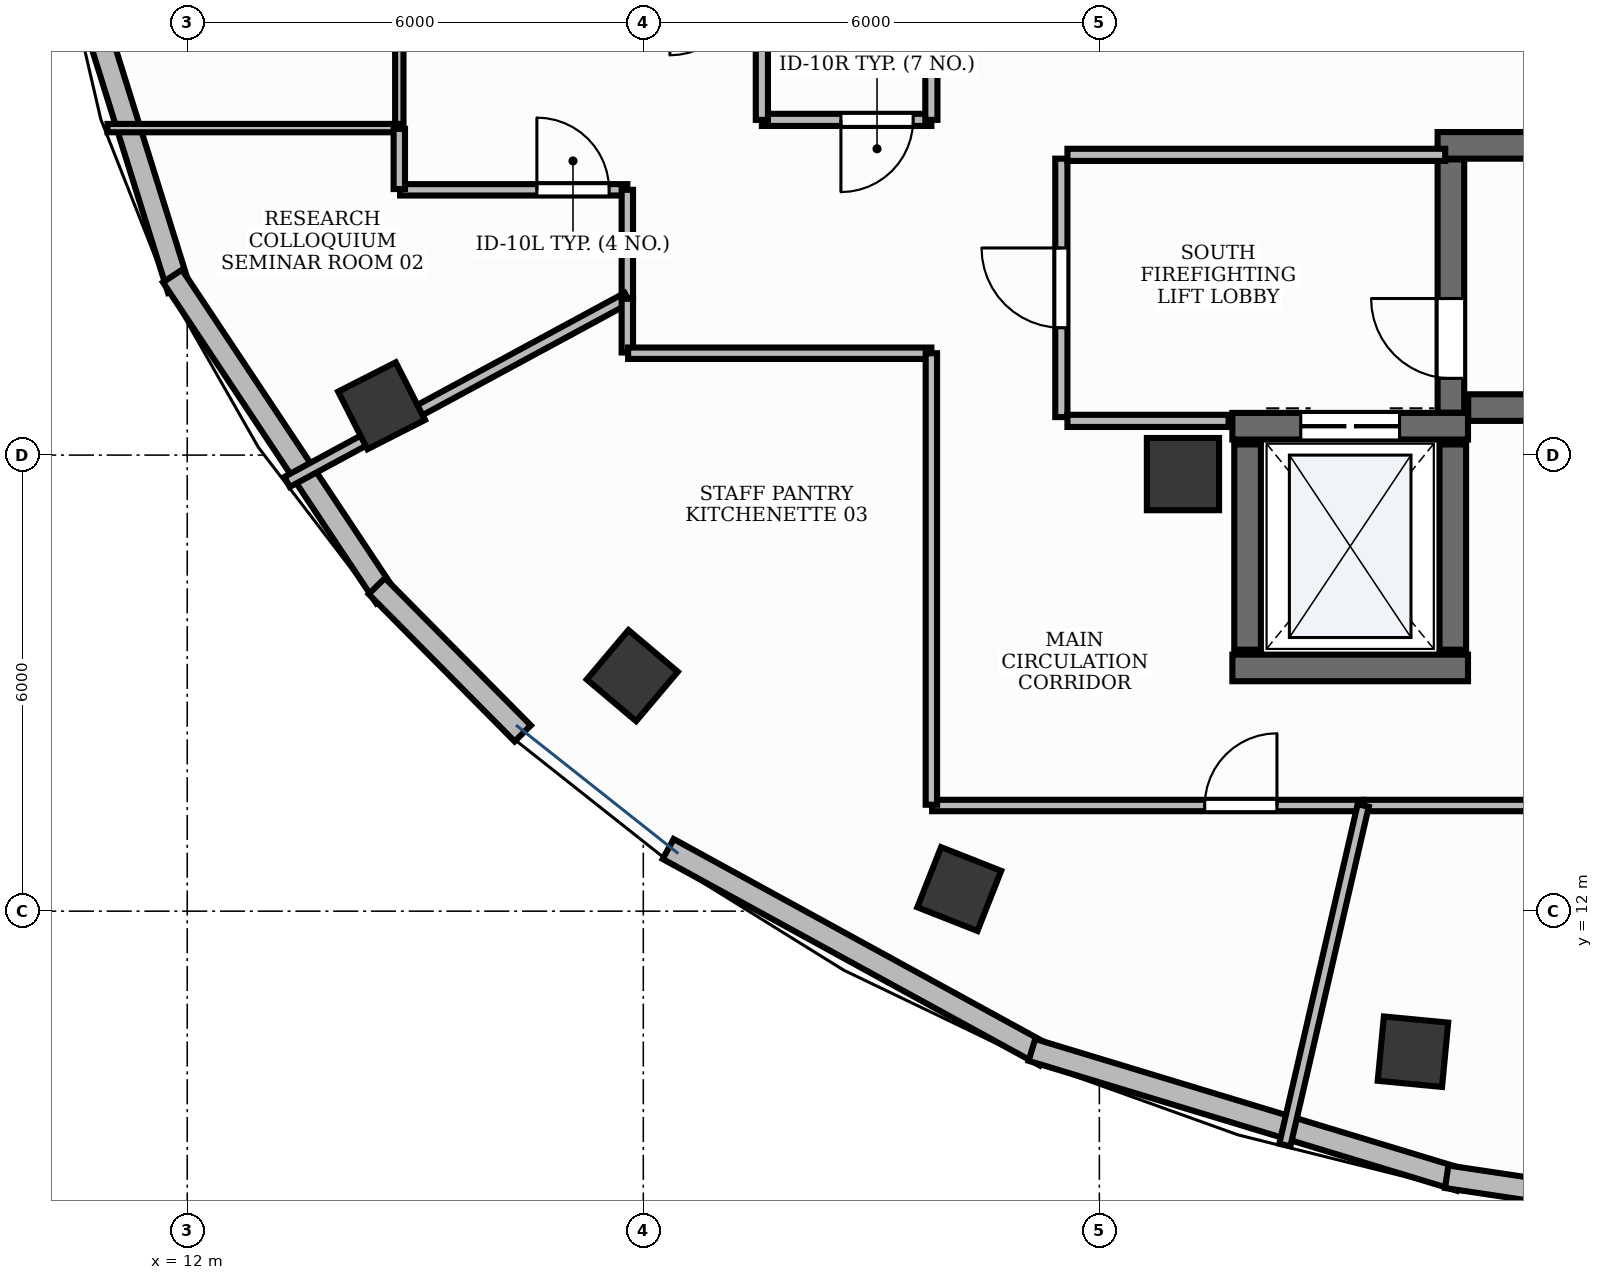
"""IFC4 building model, lengths in metres.
Left out: names, types, materials, properties, quantities, classifications, styles, units other than length and angle.
Written with IfcOpenShell. Run it as: python <this file> out.ifc"""

import sys

from ifc_helpers import new_model, si_unit, direction, frame, frame_2d, origin, origin_2d, place, context, subcontext, project, spatial, rectangle, extrude, element, fill, save


model = new_model("IFC4")
c1 = context("Model", 3, precision=1e-05, world=origin(), true_north=direction((0.0, 1.0)))
c2 = subcontext(c1, "Body", "Model", "MODEL_VIEW")
j1 = project(units=[si_unit("LENGTHUNIT", "METRE"), si_unit("PLANEANGLEUNIT", "RADIAN")], contexts=[c1])
p1 = place(None, origin())
s1 = spatial("IfcSite", under=j1, at=p1, CompositionType="ELEMENT")
p2 = place(p1, origin())
s2 = spatial("IfcBuilding", under=s1, at=p2, CompositionType="ELEMENT")
p3 = place(p2, frame((0.0, 0.0, 282.6)))
s3 = spatial("IfcBuildingStorey", under=s2, at=p3, CompositionType="ELEMENT", Elevation=282.6)
p4 = place(p3, frame((28.852, 18.625, 0.0), z_axis=(0.0, 0.0, 1.0), x_axis=(1.0, 0.0, 0.0)))
e1 = element("IfcWall", 1, at=p4, inside=s3, PredefinedType="SHEAR", context=c2, shape_type="SweptSolid", body=[
    extrude(rectangle(XDim=8.148, YDim=0.35, at=frame_2d((4.074, 0.0))), origin(), (0.0, 0.0, 1.0), 3.79),
])
p5 = place(p3, frame((28.45, 22.075, 0.0), z_axis=(0.0, 0.0, 1.0), x_axis=(1.0, 0.0, 0.0)))
e2 = element("IfcWall", 2, at=p5, inside=s3, PredefinedType="SHEAR", context=c2, shape_type="SweptSolid", body=[
    extrude(rectangle(XDim=8.55, YDim=0.35, at=frame_2d((4.275, 0.0))), origin(), (0.0, 0.0, 1.0), 3.79),
])
p6 = place(p3, frame((28.625, 18.557, 0.0), z_axis=(0.0, 0.0, 1.0), x_axis=(0.0, 1.0, 0.0)))
e3 = element("IfcWall", 3, at=p6, inside=s3, PredefinedType="SHEAR", context=c2, shape_type="SweptSolid", body=[
    extrude(rectangle(XDim=3.333, YDim=0.35, at=frame_2d((1.667, 0.0))), origin(), (0.0, 0.0, 1.0), 3.79),
])
p7 = place(p6, frame((0.453, 0.0, 0.0)))
e4 = element("IfcOpeningElement", 4, at=p7, cuts=e3, PredefinedType="OPENING", context=c2, shape_type="SweptSolid", body=[
    extrude(rectangle(XDim=1.05, YDim=2.15, at=frame_2d((0.525, 1.075))), frame((0.0, 0.19, 0.0), z_axis=(0.0, -1.0, 0.0), x_axis=(1.0, 0.0, 0.0)), (0.0, 0.0, 1.0), 0.38),
])
p8 = place(p3, frame((25.75, 15.2, 0.0), z_axis=(0.0, 0.0, 1.0), x_axis=(1.0, 0.0, 0.0)))
e5 = element("IfcWall", 5, at=p8, inside=s3, PredefinedType="SHEAR", context=c2, shape_type="SweptSolid", body=[
    extrude(rectangle(XDim=3.1, YDim=0.35, at=frame_2d((1.55, 0.0))), origin(), (0.0, 0.0, 1.0), 3.79),
])
p9 = place(p3, frame((25.75, 18.38, 0.0), z_axis=(0.0, 0.0, 1.0), x_axis=(1.0, 0.0, 0.0)))
e6 = element("IfcWall", 6, at=p9, inside=s3, PredefinedType="SHEAR", context=c2, shape_type="SweptSolid", body=[
    extrude(rectangle(XDim=3.1, YDim=0.35, at=frame_2d((1.55, 0.0))), origin(), (0.0, 0.0, 1.0), 3.79),
])
p10 = place(p9, frame((0.9, 0.0, 0.0)))
e7 = element("IfcOpeningElement", 7, at=p10, cuts=e6, PredefinedType="OPENING", context=c2, shape_type="SweptSolid", body=[
    extrude(rectangle(XDim=1.3, YDim=2.2, at=frame_2d((0.65, 1.1))), frame((0.0, 0.19, 0.0), z_axis=(0.0, -1.0, 0.0), x_axis=(1.0, 0.0, 0.0)), (0.0, 0.0, 1.0), 0.38),
])
for number, where, z_axis, x_axis in (
    (8, (25.95, 15.44, 0.0), (0.0, 0.0, 1.0), (0.0, 1.0, 0.0)),
    (9, (28.65, 15.44, 0.0), (0.0, 0.0, 1.0), (0.0, 1.0, 0.0)),
):
    element("IfcWall", number, at=place(p3, frame(where, z_axis=z_axis, x_axis=x_axis)), inside=s3, PredefinedType="SHEAR", context=c2, shape_type="SweptSolid", body=[
        extrude(rectangle(XDim=2.7, YDim=0.35, at=frame_2d((1.35, 0.0))), origin(), (0.0, 0.0, 1.0), 3.79),
    ])
p11 = place(p3, frame((25.1, 17.75, -0.0), z_axis=(0.0, 0.0, 1.0), x_axis=(1.0, 0.0, 0.0)))
e10 = element("IfcColumn", 10, at=p11, inside=s3, PredefinedType="PILASTER", context=c2, shape_type="SweptSolid", body=[
    extrude(rectangle(XDim=0.95, YDim=0.95, at=origin_2d()), origin(), (0.0, 0.0, 1.0), 3.791),
])
for number, where, z_axis, x_axis in (
    (11, (14.557, 18.649, -0.0), (0.0, 0.0, 1.0), (-0.453, 0.891, 0.0)),
    (12, (17.855, 15.099, -0.0), (0.0, 0.0, 1.0), (-0.764, 0.645, 0.0)),
    (13, (22.157, 12.291, -0.0), (0.0, 0.0, 1.0), (-0.93, 0.367, 0.0)),
    (14, (28.126, 10.151, -0.0), (0.0, 0.0, 1.0), (-0.995, 0.095, 0.0)),
):
    element("IfcColumn", number, at=place(p3, frame(where, z_axis=z_axis, x_axis=x_axis)), inside=s3, PredefinedType="COLUMN", context=c2, shape_type="SweptSolid", body=[
        extrude(rectangle(XDim=0.85, YDim=0.85, at=origin_2d()), origin(), (0.0, 0.0, 1.0), 3.791),
    ])
p12 = place(p3, frame((10.445, 24.811, 0.0), z_axis=(0.0, 0.0, 1.0), x_axis=(0.297974306034, -0.954573890772, 0.0)))
e15 = element("IfcWall", 15, at=p12, inside=s3, PredefinedType="STANDARD", context=c2, shape_type="SweptSolid", body=[
    extrude(rectangle(XDim=4.854, YDim=0.3, at=frame_2d((2.427, 0.0))), origin(), (0.0, 0.0, 1.0), 3.79),
])
p13 = place(p3, frame((11.806, 20.356, 0.0), z_axis=(0.0, 0.0, 1.0), x_axis=(0.553332864868, -0.832960227536, 0.0)))
e16 = element("IfcWall", 16, at=p13, inside=s3, PredefinedType="STANDARD", context=c2, shape_type="SweptSolid", body=[
    extrude(rectangle(XDim=5.071, YDim=0.3, at=frame_2d((2.535, 0.0))), origin(), (0.0, 0.0, 1.0), 3.36),
])
p14 = place(p3, frame((14.494, 16.277, 0.0), z_axis=(0.0, 0.0, 1.0), x_axis=(0.703787296298, -0.710410755528, 0.0)))
e17 = element("IfcWall", 17, at=p14, inside=s3, PredefinedType="STANDARD", context=c2, shape_type="SweptSolid", body=[
    extrude(rectangle(XDim=2.728, YDim=0.3, at=frame_2d((1.364, 0.0))), origin(), (0.0, 0.0, 1.0), 3.36),
])
p15 = place(p3, frame((18.327, 12.818, 0.0), z_axis=(0.0, 0.0, 1.0), x_axis=(0.877062479499, -0.480376318166, 0.0)))
e18 = element("IfcWall", 18, at=p15, inside=s3, PredefinedType="STANDARD", context=c2, shape_type="SweptSolid", body=[
    extrude(rectangle(XDim=5.654, YDim=0.3, at=frame_2d((2.827, 0.0))), origin(), (0.0, 0.0, 1.0), 3.79),
])
p16 = place(p3, frame((23.113, 10.175, 0.0), z_axis=(0.0, 0.0, 1.0), x_axis=(0.95696124157, -0.290215751008, 0.0)))
e19 = element("IfcWall", 19, at=p16, inside=s3, PredefinedType="STANDARD", context=c2, shape_type="SweptSolid", body=[
    extrude(rectangle(XDim=5.886, YDim=0.3, at=frame_2d((2.943, 0.0))), origin(), (0.0, 0.0, 1.0), 3.79),
])
p17 = place(p3, frame((28.57, 8.506, 0.0), z_axis=(0.0, 0.0, 1.0), x_axis=(0.988994950801, -0.147949272691, 0.0)))
e20 = element("IfcWall", 20, at=p17, inside=s3, PredefinedType="STANDARD", context=c2, shape_type="SweptSolid", body=[
    extrude(rectangle(XDim=3.083, YDim=0.3, at=frame_2d((1.541, 0.0))), origin(), (0.0, 0.0, 1.0), 3.79),
])
p18 = place(p3, frame((23.5, 18.5, 0.0), z_axis=(0.0, 0.0, 1.0), x_axis=(0.0, 1.0, 0.0)))
e21 = element("IfcWall", 21, at=p18, inside=s3, PredefinedType="PARTITIONING", context=c2, shape_type="SweptSolid", body=[
    extrude(rectangle(XDim=3.4, YDim=0.16, at=frame_2d((1.7, 0.0))), origin(), (0.0, 0.0, 1.0), 2.8),
])
p19 = place(p18, frame((1.175, 0.0, 0.0)))
e22 = element("IfcOpeningElement", 22, at=p19, cuts=e21, PredefinedType="OPENING", context=c2, shape_type="SweptSolid", body=[
    extrude(rectangle(XDim=1.05, YDim=2.15, at=frame_2d((0.525, 1.075))), frame((0.0, 0.095, 0.0), z_axis=(0.0, -1.0, 0.0), x_axis=(1.0, 0.0, 0.0)), (0.0, 0.0, 1.0), 0.19),
])
p20 = place(p3, frame((23.58, 21.95, 0.0), z_axis=(0.0, 0.0, 1.0), x_axis=(1.0, 0.0, 0.0)))
e23 = element("IfcWall", 23, at=p20, inside=s3, PredefinedType="PARTITIONING", context=c2, shape_type="SweptSolid", body=[
    extrude(rectangle(XDim=4.97, YDim=0.16, at=frame_2d((2.485, 0.0))), origin(), (0.0, 0.0, 1.0), 2.8),
])
p21 = place(p3, frame((23.58, 18.45, 0.0), z_axis=(0.0, 0.0, 1.0), x_axis=(1.0, 0.0, 0.0)))
e24 = element("IfcWall", 24, at=p21, inside=s3, PredefinedType="PARTITIONING", context=c2, shape_type="SweptSolid", body=[
    extrude(rectangle(XDim=2.12, YDim=0.16, at=frame_2d((1.06, 0.0))), origin(), (0.0, 0.0, 1.0), 2.8),
])
p22 = place(p3, frame((21.79, 22.41, 0.0), z_axis=(0.0, 0.0, 1.0), x_axis=(-1.0, 0.0, 0.0)))
e25 = element("IfcWall", 25, at=p22, inside=s3, PredefinedType="PARTITIONING", context=c2, shape_type="SweptSolid", body=[
    extrude(rectangle(XDim=2.23, YDim=0.16, at=frame_2d((1.115, 0.0))), origin(), (0.0, 0.0, 1.0), 2.8),
])
p23 = place(p22, frame((0.24, 0.0, 0.0)))
e26 = element("IfcOpeningElement", 26, at=p23, cuts=e25, PredefinedType="OPENING", context=c2, shape_type="SweptSolid", body=[
    extrude(rectangle(XDim=0.95, YDim=2.15, at=frame_2d((0.475, 1.075))), frame((0.0, 0.095, 0.0), z_axis=(0.0, -1.0, 0.0), x_axis=(1.0, 0.0, 0.0)), (0.0, 0.0, 1.0), 0.19),
])
p24 = place(p3, frame((14.8, 21.49, 0.0), z_axis=(0.0, 0.0, 1.0), x_axis=(1.0, 0.0, 0.0)))
e27 = element("IfcWall", 27, at=p24, inside=s3, PredefinedType="PARTITIONING", context=c2, shape_type="SweptSolid", body=[
    extrude(rectangle(XDim=2.99, YDim=0.15, at=frame_2d((1.495, 0.0))), origin(), (0.0, 0.0, 1.0), 2.8),
])
p25 = place(p24, frame((1.8, 0.0, 0.0)))
e28 = element("IfcOpeningElement", 28, at=p25, cuts=e27, PredefinedType="OPENING", context=c2, shape_type="SweptSolid", body=[
    extrude(rectangle(XDim=0.95, YDim=2.15, at=frame_2d((0.475, 1.075))), frame((0.0, 0.09, 0.0), z_axis=(0.0, -1.0, 0.0), x_axis=(1.0, 0.0, 0.0)), (0.0, 0.0, 1.0), 0.18),
])
p26 = place(p3, frame((21.8, 13.39, 0.0), z_axis=(0.0, 0.0, 1.0), x_axis=(1.0, 0.0, 0.0)))
e29 = element("IfcWall", 29, at=p26, inside=s3, PredefinedType="PARTITIONING", context=c2, shape_type="SweptSolid", body=[
    extrude(rectangle(XDim=5.671, YDim=0.15, at=frame_2d((2.835, 0.0))), origin(), (0.0, 0.0, 1.0), 2.8),
])
p27 = place(p26, frame((3.586, 0.0, 0.0)))
e30 = element("IfcOpeningElement", 30, at=p27, cuts=e29, PredefinedType="OPENING", context=c2, shape_type="SweptSolid", body=[
    extrude(rectangle(XDim=0.95, YDim=2.15, at=frame_2d((0.475, 1.075))), frame((0.0, 0.09, 0.0), z_axis=(0.0, -1.0, 0.0), x_axis=(1.0, 0.0, 0.0)), (0.0, 0.0, 1.0), 0.18),
])
p28 = place(p3, frame((27.481, 13.39, 0.0), z_axis=(0.0, 0.0, 1.0), x_axis=(1.0, 0.0, 0.0)))
e31 = element("IfcWall", 31, at=p28, inside=s3, PredefinedType="PARTITIONING", context=c2, shape_type="SweptSolid", body=[
    extrude(rectangle(XDim=11.919, YDim=0.15, at=frame_2d((5.959, 0.0))), origin(), (0.0, 0.0, 1.0), 2.8),
])
p29 = place(p28, frame((2.53, 0.0, 0.0)))
e32 = element("IfcOpeningElement", 32, at=p29, cuts=e31, PredefinedType="OPENING", context=c2, shape_type="SweptSolid", body=[
    extrude(rectangle(XDim=0.95, YDim=2.15, at=frame_2d((0.475, 1.075))), frame((0.0, 0.09, 0.0), z_axis=(0.0, -1.0, 0.0), x_axis=(1.0, 0.0, 0.0)), (0.0, 0.0, 1.0), 0.18),
])
p30 = place(p3, frame((21.79, 27.08, 0.0), z_axis=(0.0, 0.0, 1.0), x_axis=(0.0, -1.0, 0.0)))
e33 = element("IfcWall", 33, at=p30, inside=s3, PredefinedType="PARTITIONING", context=c2, shape_type="SweptSolid", body=[
    extrude(rectangle(XDim=4.67, YDim=0.16, at=frame_2d((2.335, 0.0))), origin(), (0.0, 0.0, 1.0), 2.8),
])
p31 = place(p3, frame((19.56, 22.41, 0.0), z_axis=(0.0, 0.0, 1.0), x_axis=(0.0, 1.0, 0.0)))
e34 = element("IfcWall", 34, at=p31, inside=s3, PredefinedType="PARTITIONING", context=c2, shape_type="SweptSolid", body=[
    extrude(rectangle(XDim=1.79, YDim=0.16, at=frame_2d((0.895, 0.0))), origin(), (0.0, 0.0, 1.0), 2.8),
])
p32 = place(p3, frame((14.79, 24.2, 0.0), z_axis=(0.0, 0.0, 1.0), x_axis=(0.0, -1.0, 0.0)))
e35 = element("IfcWall", 35, at=p32, inside=s3, PredefinedType="MOVABLE", context=c2, shape_type="SweptSolid", body=[
    extrude(rectangle(XDim=1.898, YDim=0.11, at=frame_2d((0.949, 0.0))), origin(), (0.0, 0.0, 1.0), 2.8),
])
p33 = place(p3, frame((14.79, 22.302, 0.0), z_axis=(0.0, 0.0, 1.0), x_axis=(-1.0, 0.0, 0.0)))
e36 = element("IfcWall", 36, at=p33, inside=s3, PredefinedType="MOVABLE", context=c2, shape_type="SweptSolid", body=[
    extrude(rectangle(XDim=3.839, YDim=0.11, at=frame_2d((1.92, 0.0))), origin(), (0.0, 0.0, 1.0), 2.8),
])
p34 = place(p3, frame((14.79, 22.292, 0.0), z_axis=(0.0, 0.0, 1.0), x_axis=(0.0, -1.0, 0.0)))
e37 = element("IfcWall", 37, at=p34, inside=s3, PredefinedType="PARTITIONING", context=c2, shape_type="SweptSolid", body=[
    extrude(rectangle(XDim=0.792, YDim=0.15, at=frame_2d((0.396, 0.0))), origin(), (0.0, 0.0, 1.0), 2.8),
])
p35 = place(p3, frame((17.79, 21.49, 0.0), z_axis=(0.0, 0.0, 1.0), x_axis=(0.0, -1.0, 0.0)))
e38 = element("IfcWall", 38, at=p35, inside=s3, PredefinedType="PARTITIONING", context=c2, shape_type="SweptSolid", body=[
    extrude(rectangle(XDim=1.422, YDim=0.15, at=frame_2d((0.711, 0.0))), origin(), (0.0, 0.0, 1.0), 2.8),
])
p36 = place(p3, frame((17.79, 20.068, 0.0), z_axis=(0.0, 0.0, 1.0), x_axis=(-0.87964413558, -0.475632415568, 0.0)))
e39 = element("IfcWall", 39, at=p36, inside=s3, PredefinedType="PARTITIONING", context=c2, shape_type="SweptSolid", body=[
    extrude(rectangle(XDim=5.089, YDim=0.15, at=frame_2d((2.545, 0.0))), origin(), (0.0, 0.0, 1.0), 2.8),
])
p37 = place(p3, frame((17.79, 20.056, 0.0), z_axis=(0.0, 0.0, 1.0), x_axis=(0.0, -1.0, 0.0)))
e40 = element("IfcWall", 40, at=p37, inside=s3, PredefinedType="PARTITIONING", context=c2, shape_type="SweptSolid", body=[
    extrude(rectangle(XDim=0.706, YDim=0.15, at=frame_2d((0.353, 0.0))), origin(), (0.0, 0.0, 1.0), 2.8),
])
p38 = place(p3, frame((17.8, 19.34, 0.0), z_axis=(0.0, 0.0, 1.0), x_axis=(1.0, 0.0, 0.0)))
e41 = element("IfcWall", 41, at=p38, inside=s3, PredefinedType="PARTITIONING", context=c2, shape_type="SweptSolid", body=[
    extrude(rectangle(XDim=3.99, YDim=0.15, at=frame_2d((1.995, 0.0))), origin(), (0.0, 0.0, 1.0), 2.8),
])
p39 = place(p3, frame((21.79, 19.34, 0.0), z_axis=(0.0, 0.0, 1.0), x_axis=(0.0, -1.0, 0.0)))
e42 = element("IfcWall", 42, at=p39, inside=s3, PredefinedType="PARTITIONING", context=c2, shape_type="SweptSolid", body=[
    extrude(rectangle(XDim=5.94, YDim=0.15, at=frame_2d((2.97, 0.0))), origin(), (0.0, 0.0, 1.0), 2.8),
])
p40 = place(p3, frame((27.471, 13.39, 0.0), z_axis=(0.0, 0.0, 1.0), x_axis=(-0.224925634905, -0.974375932976, 0.0)))
e43 = element("IfcWall", 43, at=p40, inside=s3, PredefinedType="PARTITIONING", context=c2, shape_type="SweptSolid", body=[
    extrude(rectangle(XDim=4.584, YDim=0.15, at=frame_2d((2.292, 0.0))), origin(), (0.0, 0.0, 1.0), 2.8),
])
p41 = place(p7, origin())
e44 = element("IfcDoor", 44, at=p41, inside=s3, OperationType="SINGLE_SWING_RIGHT", PredefinedType="DOOR", context=c2, shape_type="SweptSolid", body=[
    extrude(rectangle(XDim=1.05, YDim=2.15, at=frame_2d((0.525, 1.075))), frame((0.0, 0.025, 0.0), z_axis=(0.0, -1.0, 0.0), x_axis=(1.0, 0.0, 0.0)), (0.0, 0.0, 1.0), 0.05),
])
fill(e4, e44)
p42 = place(p10, origin())
e45 = element("IfcDoor", 45, at=p42, inside=s3, OperationType="DOUBLE_DOOR_SLIDING", PredefinedType="DOOR", context=c2, shape_type="SweptSolid", body=[
    extrude(rectangle(XDim=1.3, YDim=2.2, at=frame_2d((0.65, 1.1))), frame((0.0, 0.025, 0.0), z_axis=(0.0, -1.0, 0.0), x_axis=(1.0, 0.0, 0.0)), (0.0, 0.0, 1.0), 0.05),
])
fill(e7, e45)
p43 = place(p19, origin())
e46 = element("IfcDoor", 46, at=p43, inside=s3, OperationType="SINGLE_SWING_RIGHT", PredefinedType="DOOR", context=c2, shape_type="SweptSolid", body=[
    extrude(rectangle(XDim=1.05, YDim=2.15, at=frame_2d((0.525, 1.075))), frame((0.0, 0.025, 0.0), z_axis=(0.0, -1.0, 0.0), x_axis=(1.0, 0.0, 0.0)), (0.0, 0.0, 1.0), 0.05),
])
fill(e22, e46)
p44 = place(p23, origin())
e47 = element("IfcDoor", 47, at=p44, inside=s3, OperationType="SINGLE_SWING_RIGHT", PredefinedType="DOOR", context=c2, shape_type="SweptSolid", body=[
    extrude(rectangle(XDim=0.95, YDim=2.15, at=frame_2d((0.475, 1.075))), frame((0.0, 0.025, 0.0), z_axis=(0.0, -1.0, 0.0), x_axis=(1.0, 0.0, 0.0)), (0.0, 0.0, 1.0), 0.05),
])
fill(e26, e47)
p45 = place(p25, origin())
e48 = element("IfcDoor", 48, at=p45, inside=s3, OperationType="SINGLE_SWING_LEFT", PredefinedType="DOOR", context=c2, shape_type="SweptSolid", body=[
    extrude(rectangle(XDim=0.95, YDim=2.15, at=frame_2d((0.475, 1.075))), frame((0.0, 0.025, 0.0), z_axis=(0.0, -1.0, 0.0), x_axis=(1.0, 0.0, 0.0)), (0.0, 0.0, 1.0), 0.05),
])
fill(e28, e48)
p46 = place(p27, origin())
e49 = element("IfcDoor", 49, at=p46, inside=s3, OperationType="SINGLE_SWING_RIGHT", PredefinedType="DOOR", context=c2, shape_type="SweptSolid", body=[
    extrude(rectangle(XDim=0.95, YDim=2.15, at=frame_2d((0.475, 1.075))), frame((0.0, 0.025, 0.0), z_axis=(0.0, -1.0, 0.0), x_axis=(1.0, 0.0, 0.0)), (0.0, 0.0, 1.0), 0.05),
])
fill(e30, e49)
save(model, sys.argv[1])
